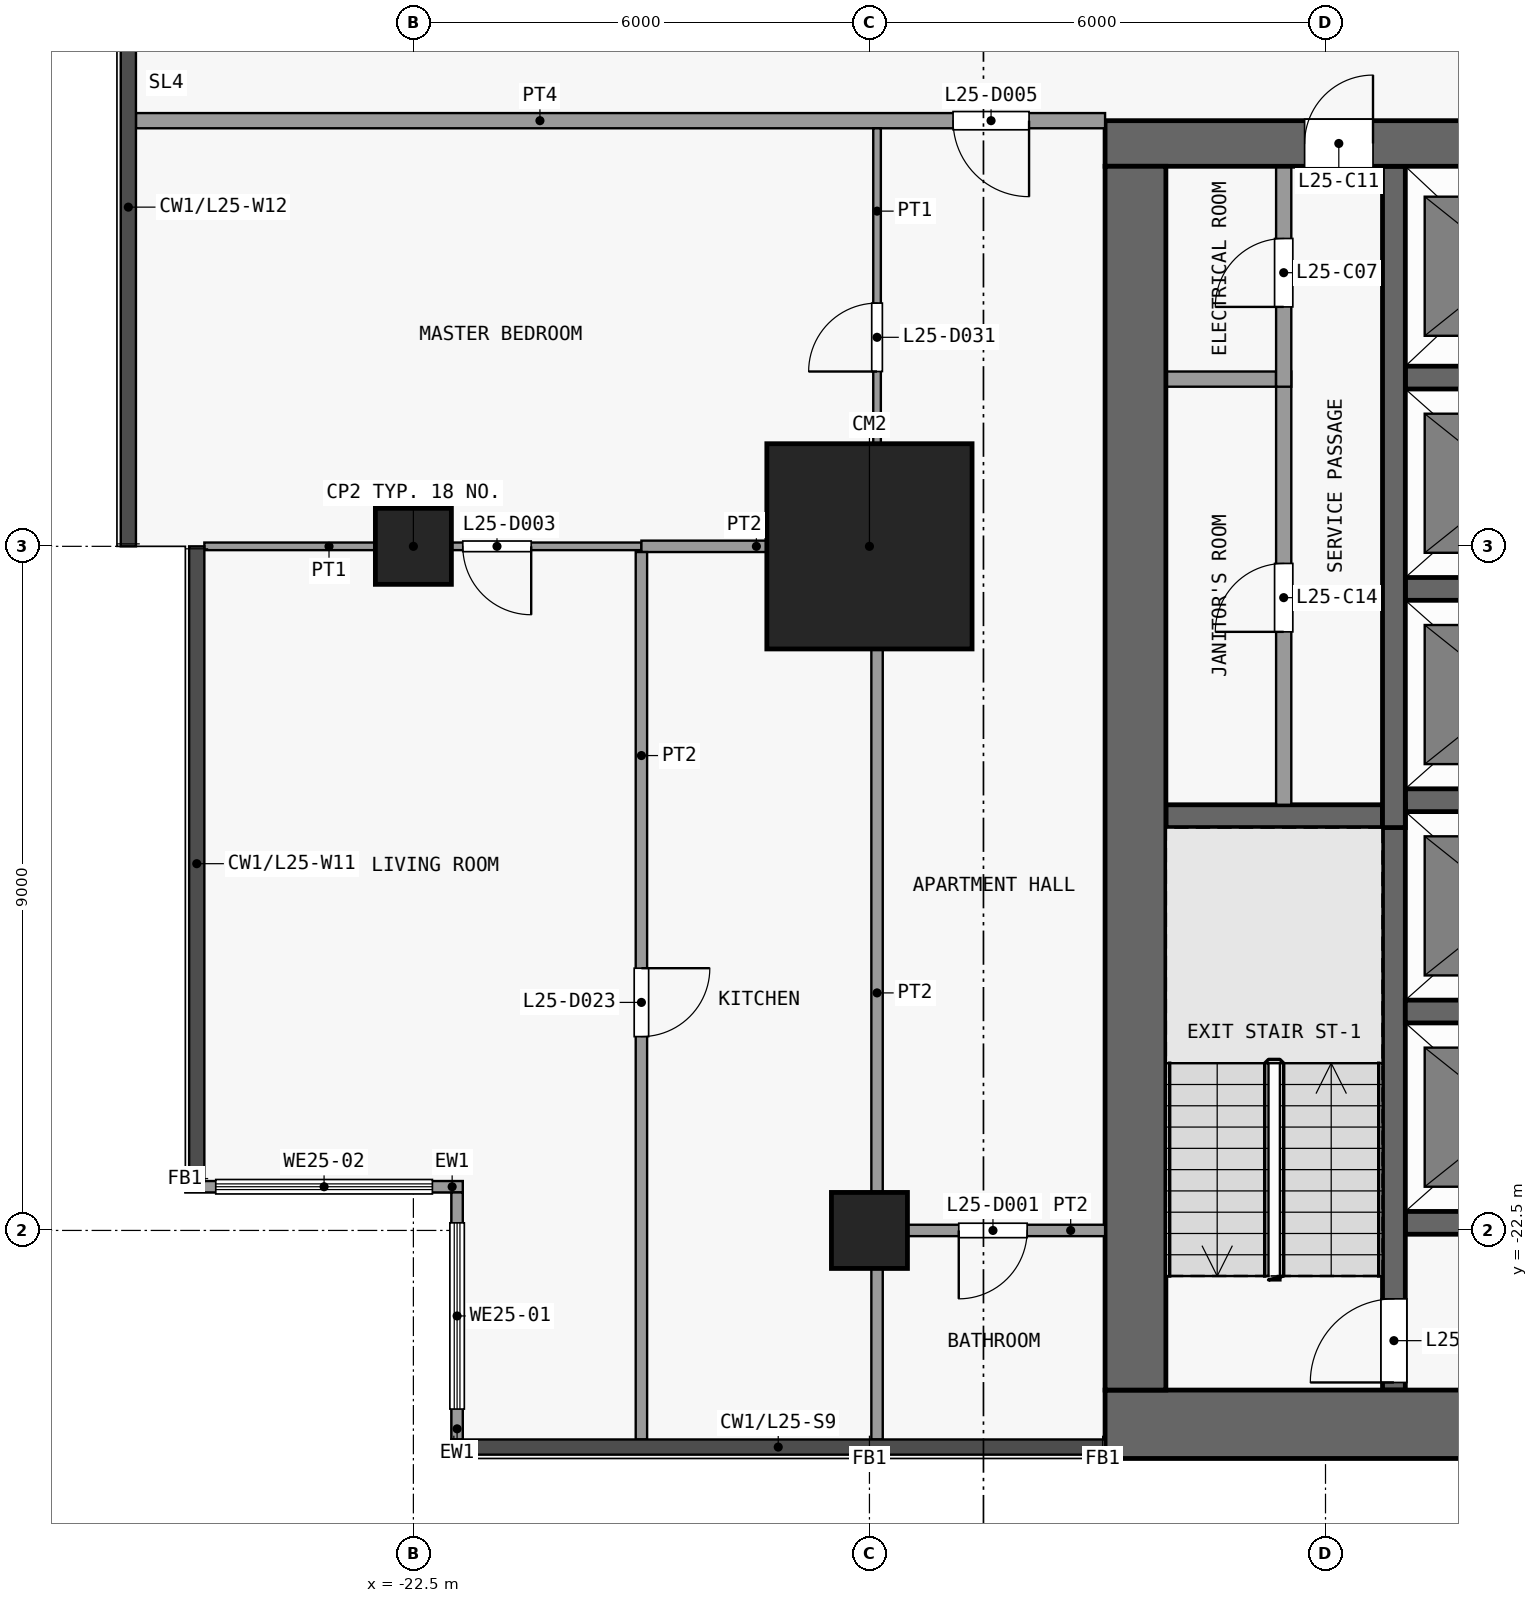
"""IFC4 building model, lengths in metres.
Left out: names, types, materials, properties, quantities, classifications, styles, units other than length and angle.
Written with IfcOpenShell. Run it as: python <this file> out.ifc"""

import sys

from ifc_helpers import new_model, si_unit, direction, frame, frame_2d, origin, origin_2d, place, context, subcontext, project, spatial, rectangle, extrude, element, fill, save


model = new_model("IFC4")
c1 = context("Model", 3, precision=1e-05, world=origin(), true_north=direction((0.0, 1.0)))
c2 = subcontext(c1, "Body", "Model", "MODEL_VIEW")
j1 = project(units=[si_unit("LENGTHUNIT", "METRE"), si_unit("PLANEANGLEUNIT", "RADIAN")], contexts=[c1])
p1 = place(None, origin())
s1 = spatial("IfcSite", under=j1, at=p1, CompositionType="ELEMENT")
p2 = place(p1, origin())
s2 = spatial("IfcBuilding", under=s1, at=p2, CompositionType="ELEMENT")
p3 = place(p2, frame((0.0, 0.0, 102.7)))
s3 = spatial("IfcBuildingStorey", under=s2, at=p3, CompositionType="ELEMENT", Elevation=102.7)
for number, where, z_axis, x_axis in (
    (1, (-22.5, -13.5, 0.0), (0.0, 0.0, 1.0), (1.0, 0.0, 0.0)),
    (2, (-16.5, -22.5, 0.0), (0.0, 0.0, 1.0), (1.0, 0.0, 0.0)),
):
    element("IfcColumn", number, at=place(p3, frame(where, z_axis=z_axis, x_axis=x_axis)), inside=s3, PredefinedType="COLUMN", context=c2, shape_type="SweptSolid", body=[
        extrude(rectangle(XDim=1.0, YDim=1.0, at=origin_2d()), origin(), (0.0, 0.0, 1.0), 3.6),
    ])
p4 = place(p3, frame((-16.5, -13.5, 0.0), z_axis=(0.0, 0.0, 1.0), x_axis=(1.0, 0.0, 0.0)))
e3 = element("IfcColumn", 3, at=p4, inside=s3, PredefinedType="COLUMN", context=c2, shape_type="SweptSolid", body=[
    extrude(rectangle(XDim=2.7, YDim=2.7, at=origin_2d()), origin(), (0.0, 0.0, 1.0), 3.6),
])
p5 = place(p3, frame((-13.4, -25.05, 0.0), z_axis=(0.0, 0.0, 1.0), x_axis=(1.0, 0.0, 0.0)))
e4 = element("IfcWall", 4, at=p5, inside=s3, PredefinedType="SHEAR", context=c2, shape_type="SweptSolid", body=[
    extrude(rectangle(XDim=26.8, YDim=0.9, at=frame_2d((13.4, 0.0))), origin(), (0.0, 0.0, 1.0), 3.3),
])
p6 = place(p3, frame((-13.4, -8.2, 0.0), z_axis=(0.0, 0.0, 1.0), x_axis=(1.0, 0.0, 0.0)))
e5 = element("IfcWall", 5, at=p6, inside=s3, PredefinedType="SHEAR", context=c2, shape_type="SweptSolid", body=[
    extrude(rectangle(XDim=26.8, YDim=0.6, at=frame_2d((13.4, 0.0))), origin(), (0.0, 0.0, 1.0), 3.3),
])
p7 = place(p6, frame((7.7, 0.0, 0.0)))
e6 = element("IfcOpeningElement", 6, at=p7, cuts=e5, PredefinedType="OPENING", context=c2, shape_type="SweptSolid", body=[
    extrude(rectangle(XDim=1.8, YDim=2.1, at=frame_2d((0.9, 1.05))), frame((0.0, 0.31, 0.0), z_axis=(0.0, -1.0, 0.0), x_axis=(1.0, 0.0, 0.0)), (0.0, 0.0, 1.0), 0.62),
])
p8 = place(p6, frame((17.3, 0.0, 0.0)))
e7 = element("IfcOpeningElement", 7, at=p8, cuts=e5, PredefinedType="OPENING", context=c2, shape_type="SweptSolid", body=[
    extrude(rectangle(XDim=1.8, YDim=2.1, at=frame_2d((0.9, 1.05))), frame((0.0, 0.31, 0.0), z_axis=(0.0, -1.0, 0.0), x_axis=(1.0, 0.0, 0.0)), (0.0, 0.0, 1.0), 0.62),
])
p9 = place(p6, frame((2.625, 0.0, 0.0)))
e8 = element("IfcOpeningElement", 8, at=p9, cuts=e5, PredefinedType="OPENING", context=c2, shape_type="SweptSolid", body=[
    extrude(rectangle(XDim=0.9, YDim=2.1, at=frame_2d((0.45, 1.05))), frame((0.0, 0.31, 0.0), z_axis=(0.0, -1.0, 0.0), x_axis=(1.0, 0.0, 0.0)), (0.0, 0.0, 1.0), 0.62),
])
p10 = place(p6, frame((23.275, 0.0, 0.0)))
e9 = element("IfcOpeningElement", 9, at=p10, cuts=e5, PredefinedType="OPENING", context=c2, shape_type="SweptSolid", body=[
    extrude(rectangle(XDim=0.9, YDim=2.1, at=frame_2d((0.45, 1.05))), frame((0.0, 0.31, 0.0), z_axis=(0.0, -1.0, 0.0), x_axis=(1.0, 0.0, 0.0)), (0.0, 0.0, 1.0), 0.62),
])
p11 = place(p3, frame((-13.0, -24.6, 0.0), z_axis=(0.0, 0.0, 1.0), x_axis=(0.0, 1.0, 0.0)))
e10 = element("IfcWall", 10, at=p11, inside=s3, PredefinedType="SHEAR", context=c2, shape_type="SweptSolid", body=[
    extrude(rectangle(XDim=16.1, YDim=0.8, at=frame_2d((8.05, 0.0))), origin(), (0.0, 0.0, 1.0), 3.3),
])
for number, where, z_axis, x_axis in (
    (11, (-9.45, -22.4, 0.0), (0.0, 0.0, 1.0), (1.0, 0.0, 0.0)),
    (12, (-9.45, -19.62, 0.0), (0.0, 0.0, 1.0), (1.0, 0.0, 0.0)),
):
    element("IfcWall", number, at=place(p3, frame(where, z_axis=z_axis, x_axis=x_axis)), inside=s3, PredefinedType="SHEAR", context=c2, shape_type="SweptSolid", body=[
        extrude(rectangle(XDim=2.8, YDim=0.3, at=frame_2d((1.4, 0.0))), origin(), (0.0, 0.0, 1.0), 3.3),
    ])
p12 = place(p3, frame((-12.6, -17.05, 0.0), z_axis=(0.0, 0.0, 1.0), x_axis=(1.0, 0.0, 0.0)))
e13 = element("IfcWall", 13, at=p12, inside=s3, PredefinedType="SHEAR", context=c2, shape_type="SweptSolid", body=[
    extrude(rectangle(XDim=2.85, YDim=0.3, at=frame_2d((1.425, 0.0))), origin(), (0.0, 0.0, 1.0), 3.3),
])
for number, where, z_axis, x_axis in (
    (14, (-9.45, -16.84, 0.0), (0.0, 0.0, 1.0), (1.0, 0.0, 0.0)),
    (15, (-9.45, -14.06, 0.0), (0.0, 0.0, 1.0), (1.0, 0.0, 0.0)),
):
    element("IfcWall", number, at=place(p3, frame(where, z_axis=z_axis, x_axis=x_axis)), inside=s3, PredefinedType="SHEAR", context=c2, shape_type="SweptSolid", body=[
        extrude(rectangle(XDim=2.8, YDim=0.3, at=frame_2d((1.4, 0.0))), origin(), (0.0, 0.0, 1.0), 3.3),
    ])
p13 = place(p3, frame((-12.6, -11.3, 0.0), z_axis=(0.0, 0.0, 1.0), x_axis=(1.0, 0.0, 0.0)))
e16 = element("IfcWall", 16, at=p13, inside=s3, PredefinedType="PARTITIONING", context=c2, shape_type="SweptSolid", body=[
    extrude(rectangle(XDim=1.45, YDim=0.2, at=frame_2d((0.725, 0.0))), origin(), (0.0, 0.0, 1.0), 3.3),
])
p14 = place(p3, frame((-9.45, -11.28, 0.0), z_axis=(0.0, 0.0, 1.0), x_axis=(1.0, 0.0, 0.0)))
e17 = element("IfcWall", 17, at=p14, inside=s3, PredefinedType="SHEAR", context=c2, shape_type="SweptSolid", body=[
    extrude(rectangle(XDim=2.8, YDim=0.3, at=frame_2d((1.4, 0.0))), origin(), (0.0, 0.0, 1.0), 3.3),
])
p15 = place(p3, frame((-11.05, -16.9, 0.0), z_axis=(0.0, 0.0, 1.0), x_axis=(0.0, 1.0, 0.0)))
e18 = element("IfcWall", 18, at=p15, inside=s3, PredefinedType="PARTITIONING", context=c2, shape_type="SweptSolid", body=[
    extrude(rectangle(XDim=5.7, YDim=0.2, at=frame_2d((2.85, 0.0))), origin(), (0.0, 0.0, 1.0), 3.3),
])
p16 = place(p15, frame((2.275, 0.0, 0.0)))
e19 = element("IfcOpeningElement", 19, at=p16, cuts=e18, PredefinedType="OPENING", context=c2, shape_type="SweptSolid", body=[
    extrude(rectangle(XDim=0.9, YDim=2.1, at=frame_2d((0.45, 1.05))), frame((0.0, 0.11, 0.0), z_axis=(0.0, -1.0, 0.0), x_axis=(1.0, 0.0, 0.0)), (0.0, 0.0, 1.0), 0.22),
])
p17 = place(p3, frame((-11.05, -11.4, 0.0), z_axis=(0.0, 0.0, 1.0), x_axis=(0.0, 1.0, 0.0)))
e20 = element("IfcWall", 20, at=p17, inside=s3, PredefinedType="PARTITIONING", context=c2, shape_type="SweptSolid", body=[
    extrude(rectangle(XDim=2.9, YDim=0.2, at=frame_2d((1.45, 0.0))), origin(), (0.0, 0.0, 1.0), 3.3),
])
p18 = place(p17, frame((1.05, 0.0, 0.0)))
e21 = element("IfcOpeningElement", 21, at=p18, cuts=e20, PredefinedType="OPENING", context=c2, shape_type="SweptSolid", body=[
    extrude(rectangle(XDim=0.9, YDim=2.1, at=frame_2d((0.45, 1.05))), frame((0.0, 0.11, 0.0), z_axis=(0.0, -1.0, 0.0), x_axis=(1.0, 0.0, 0.0)), (0.0, 0.0, 1.0), 0.22),
])
p19 = place(p3, frame((-9.6, -24.6, 0.0), z_axis=(0.0, 0.0, 1.0), x_axis=(0.0, 1.0, 0.0)))
e22 = element("IfcWall", 22, at=p19, inside=s3, PredefinedType="SHEAR", context=c2, shape_type="SweptSolid", body=[
    extrude(rectangle(XDim=7.7, YDim=0.3, at=frame_2d((3.85, 0.0))), origin(), (0.0, 0.0, 1.0), 3.3),
])
p20 = place(p19, frame((0.1, 0.0, 0.0)))
e23 = element("IfcOpeningElement", 23, at=p20, cuts=e22, PredefinedType="OPENING", context=c2, shape_type="SweptSolid", body=[
    extrude(rectangle(XDim=1.1, YDim=2.1, at=frame_2d((0.55, 1.05))), frame((0.0, 0.16, 0.0), z_axis=(0.0, -1.0, 0.0), x_axis=(1.0, 0.0, 0.0)), (0.0, 0.0, 1.0), 0.32),
])
p21 = place(p3, frame((-9.6, -17.2, 0.0), z_axis=(0.0, 0.0, 1.0), x_axis=(0.0, 1.0, 0.0)))
e24 = element("IfcWall", 24, at=p21, inside=s3, PredefinedType="SHEAR", context=c2, shape_type="SweptSolid", body=[
    extrude(rectangle(XDim=8.7, YDim=0.3, at=frame_2d((4.35, 0.0))), origin(), (0.0, 0.0, 1.0), 3.3),
])
p22 = place(p3, frame((-21.925, -25.25, 0.0), z_axis=(0.0, 0.0, 1.0), x_axis=(0.0, 1.0, 0.0)))
e25 = element("IfcWall", 25, at=p22, inside=s3, PredefinedType="SOLIDWALL", context=c2, shape_type="SweptSolid", body=[
    extrude(rectangle(XDim=3.25, YDim=0.15, at=frame_2d((1.625, 0.0))), origin(), (0.0, 0.0, 1.0), 3.3),
])
p23 = place(p22, frame((0.4, 0.0, 0.9)))
e26 = element("IfcOpeningElement", 26, at=p23, cuts=e25, PredefinedType="OPENING", context=c2, shape_type="SweptSolid", body=[
    extrude(rectangle(XDim=2.45, YDim=2.4, at=frame_2d((1.225, 1.2))), frame((0.0, 0.085, 0.0), z_axis=(0.0, -1.0, 0.0), x_axis=(1.0, 0.0, 0.0)), (0.0, 0.0, 1.0), 0.17),
])
p24 = place(p3, frame((-21.85, -21.925, 0.0), z_axis=(0.0, 0.0, 1.0), x_axis=(-1.0, 0.0, 0.0)))
e27 = element("IfcWall", 27, at=p24, inside=s3, PredefinedType="SOLIDWALL", context=c2, shape_type="SweptSolid", body=[
    extrude(rectangle(XDim=3.65, YDim=0.15, at=frame_2d((1.825, 0.0))), origin(), (0.0, 0.0, 1.0), 3.3),
])
p25 = place(p24, frame((0.4, 0.0, 0.9)))
e28 = element("IfcOpeningElement", 28, at=p25, cuts=e27, PredefinedType="OPENING", context=c2, shape_type="SweptSolid", body=[
    extrude(rectangle(XDim=2.85, YDim=2.4, at=frame_2d((1.425, 1.2))), frame((0.0, 0.085, 0.0), z_axis=(0.0, -1.0, 0.0), x_axis=(1.0, 0.0, 0.0)), (0.0, 0.0, 1.0), 0.17),
])
p26 = place(p3, frame((-16.325, -22.5, 0.0), z_axis=(0.0, 0.0, 1.0), x_axis=(1.0, 0.0, 0.0)))
e29 = element("IfcWall", 29, at=p26, inside=s3, PredefinedType="PARTITIONING", context=c2, shape_type="SweptSolid", body=[
    extrude(rectangle(XDim=2.925, YDim=0.15, at=frame_2d((1.462, 0.0))), origin(), (0.0, 0.0, 1.0), 3.3),
])
p27 = place(p26, frame((1.0, 0.0, 0.0)))
e30 = element("IfcOpeningElement", 30, at=p27, cuts=e29, PredefinedType="OPENING", context=c2, shape_type="SweptSolid", body=[
    extrude(rectangle(XDim=0.9, YDim=2.1, at=frame_2d((0.45, 1.05))), frame((0.0, 0.085, 0.0), z_axis=(0.0, -1.0, 0.0), x_axis=(1.0, 0.0, 0.0)), (0.0, 0.0, 1.0), 0.17),
])
p28 = place(p3, frame((-25.25, -13.5, 0.0), z_axis=(0.0, 0.0, 1.0), x_axis=(1.0, 0.0, 0.0)))
e31 = element("IfcWall", 31, at=p28, inside=s3, PredefinedType="PARTITIONING", context=c2, shape_type="SweptSolid", body=[
    extrude(rectangle(XDim=5.75, YDim=0.1, at=frame_2d((2.875, 0.0))), origin(), (0.0, 0.0, 1.0), 3.3),
])
p29 = place(p28, frame((3.4, 0.0, 0.0)))
e32 = element("IfcOpeningElement", 32, at=p29, cuts=e31, PredefinedType="OPENING", context=c2, shape_type="SweptSolid", body=[
    extrude(rectangle(XDim=0.9, YDim=2.1, at=frame_2d((0.45, 1.05))), frame((0.0, 0.06, 0.0), z_axis=(0.0, -1.0, 0.0), x_axis=(1.0, 0.0, 0.0)), (0.0, 0.0, 1.0), 0.12),
])
p30 = place(p3, frame((-19.5, -13.5, 0.0), z_axis=(0.0, 0.0, 1.0), x_axis=(1.0, 0.0, 0.0)))
e33 = element("IfcWall", 33, at=p30, inside=s3, PredefinedType="PARTITIONING", context=c2, shape_type="SweptSolid", body=[
    extrude(rectangle(XDim=3.025, YDim=0.15, at=frame_2d((1.512, 0.0))), origin(), (0.0, 0.0, 1.0), 3.3),
])
p31 = place(p3, frame((-26.15, -7.9, 0.0), z_axis=(0.0, 0.0, 1.0), x_axis=(1.0, 0.0, 0.0)))
e34 = element("IfcWall", 34, at=p31, inside=s3, PredefinedType="PARTITIONING", context=c2, shape_type="SweptSolid", body=[
    extrude(rectangle(XDim=12.75, YDim=0.2, at=frame_2d((6.375, 0.0))), origin(), (0.0, 0.0, 1.0), 3.3),
])
p32 = place(p31, frame((10.75, 0.0, 0.0)))
e35 = element("IfcOpeningElement", 35, at=p32, cuts=e34, PredefinedType="OPENING", context=c2, shape_type="SweptSolid", body=[
    extrude(rectangle(XDim=1.0, YDim=2.1, at=frame_2d((0.5, 1.05))), frame((0.0, 0.11, 0.0), z_axis=(0.0, -1.0, 0.0), x_axis=(1.0, 0.0, 0.0)), (0.0, 0.0, 1.0), 0.22),
])
p33 = place(p3, frame((-19.5, -25.25, 0.0), z_axis=(0.0, 0.0, 1.0), x_axis=(0.0, 1.0, 0.0)))
e36 = element("IfcWall", 36, at=p33, inside=s3, PredefinedType="PARTITIONING", context=c2, shape_type="SweptSolid", body=[
    extrude(rectangle(XDim=11.675, YDim=0.15, at=frame_2d((5.837, 0.0))), origin(), (0.0, 0.0, 1.0), 3.3),
])
p34 = place(p33, frame((5.3, 0.0, 0.0)))
e37 = element("IfcOpeningElement", 37, at=p34, cuts=e36, PredefinedType="OPENING", context=c2, shape_type="SweptSolid", body=[
    extrude(rectangle(XDim=0.9, YDim=2.1, at=frame_2d((0.45, 1.05))), frame((0.0, 0.085, 0.0), z_axis=(0.0, -1.0, 0.0), x_axis=(1.0, 0.0, 0.0)), (0.0, 0.0, 1.0), 0.17),
])
p35 = place(p3, frame((-16.4, -13.5, 0.0), z_axis=(0.0, 0.0, 1.0), x_axis=(0.0, 1.0, 0.0)))
e38 = element("IfcWall", 38, at=p35, inside=s3, PredefinedType="PARTITIONING", context=c2, shape_type="SweptSolid", body=[
    extrude(rectangle(XDim=5.5, YDim=0.1, at=frame_2d((2.75, 0.0))), origin(), (0.0, 0.0, 1.0), 3.3),
])
p36 = place(p35, frame((2.3, 0.0, 0.0)))
e39 = element("IfcOpeningElement", 39, at=p36, cuts=e38, PredefinedType="OPENING", context=c2, shape_type="SweptSolid", body=[
    extrude(rectangle(XDim=0.9, YDim=2.1, at=frame_2d((0.45, 1.05))), frame((0.0, 0.06, 0.0), z_axis=(0.0, -1.0, 0.0), x_axis=(1.0, 0.0, 0.0)), (0.0, 0.0, 1.0), 0.12),
])
p37 = place(p3, frame((-16.4, -25.25, 0.0), z_axis=(0.0, 0.0, 1.0), x_axis=(0.0, 1.0, 0.0)))
e40 = element("IfcWall", 40, at=p37, inside=s3, PredefinedType="PARTITIONING", context=c2, shape_type="SweptSolid", body=[
    extrude(rectangle(XDim=11.75, YDim=0.15, at=frame_2d((5.875, 0.0))), origin(), (0.0, 0.0, 1.0), 3.3),
])
p38 = place(p18, origin())
e41 = element("IfcDoor", 41, at=p38, inside=s3, OperationType="SINGLE_SWING_LEFT", PredefinedType="DOOR", context=c2, shape_type="SweptSolid", body=[
    extrude(rectangle(XDim=0.9, YDim=2.1, at=frame_2d((0.45, 1.05))), frame((0.0, 0.025, 0.0), z_axis=(0.0, -1.0, 0.0), x_axis=(1.0, 0.0, 0.0)), (0.0, 0.0, 1.0), 0.05),
])
fill(e21, e41)
p39 = place(p9, origin())
e42 = element("IfcDoor", 42, at=p39, inside=s3, OperationType="SINGLE_SWING_RIGHT", PredefinedType="DOOR", context=c2, shape_type="SweptSolid", body=[
    extrude(rectangle(XDim=0.9, YDim=2.1, at=frame_2d((0.45, 1.05))), frame((0.0, 0.025, 0.0), z_axis=(0.0, -1.0, 0.0), x_axis=(1.0, 0.0, 0.0)), (0.0, 0.0, 1.0), 0.05),
])
fill(e8, e42)
p40 = place(p16, origin())
e43 = element("IfcDoor", 43, at=p40, inside=s3, OperationType="SINGLE_SWING_LEFT", PredefinedType="DOOR", context=c2, shape_type="SweptSolid", body=[
    extrude(rectangle(XDim=0.9, YDim=2.1, at=frame_2d((0.45, 1.05))), frame((0.0, 0.025, 0.0), z_axis=(0.0, -1.0, 0.0), x_axis=(1.0, 0.0, 0.0)), (0.0, 0.0, 1.0), 0.05),
])
fill(e19, e43)
p41 = place(p20, origin())
e44 = element("IfcDoor", 44, at=p41, inside=s3, OperationType="SINGLE_SWING_LEFT", PredefinedType="DOOR", context=c2, shape_type="SweptSolid", body=[
    extrude(rectangle(XDim=1.1, YDim=2.1, at=frame_2d((0.55, 1.05))), frame((0.0, 0.025, 0.0), z_axis=(0.0, -1.0, 0.0), x_axis=(1.0, 0.0, 0.0)), (0.0, 0.0, 1.0), 0.05),
])
fill(e23, e44)
p42 = place(p23, origin())
e45 = element("IfcWindow", 45, at=p42, inside=s3, PartitioningType="SINGLE_PANEL", PredefinedType="WINDOW", context=c2, shape_type="SweptSolid", body=[
    extrude(rectangle(XDim=2.45, YDim=2.4, at=frame_2d((1.225, 1.2))), frame((0.0, 0.03, 0.0), z_axis=(0.0, -1.0, 0.0), x_axis=(1.0, 0.0, 0.0)), (0.0, 0.0, 1.0), 0.06),
])
fill(e26, e45)
p43 = place(p25, origin())
e46 = element("IfcWindow", 46, at=p43, inside=s3, PartitioningType="SINGLE_PANEL", PredefinedType="WINDOW", context=c2, shape_type="SweptSolid", body=[
    extrude(rectangle(XDim=2.85, YDim=2.4, at=frame_2d((1.425, 1.2))), frame((0.0, 0.03, 0.0), z_axis=(0.0, -1.0, 0.0), x_axis=(1.0, 0.0, 0.0)), (0.0, 0.0, 1.0), 0.06),
])
fill(e28, e46)
p44 = place(p27, origin())
e47 = element("IfcDoor", 47, at=p44, inside=s3, OperationType="SINGLE_SWING_LEFT", PredefinedType="DOOR", context=c2, shape_type="SweptSolid", body=[
    extrude(rectangle(XDim=0.9, YDim=2.1, at=frame_2d((0.45, 1.05))), frame((0.0, 0.025, 0.0), z_axis=(0.0, -1.0, 0.0), x_axis=(1.0, 0.0, 0.0)), (0.0, 0.0, 1.0), 0.05),
])
fill(e30, e47)
p45 = place(p29, origin())
e48 = element("IfcDoor", 48, at=p45, inside=s3, OperationType="SINGLE_SWING_RIGHT", PredefinedType="DOOR", context=c2, shape_type="SweptSolid", body=[
    extrude(rectangle(XDim=0.9, YDim=2.1, at=frame_2d((0.45, 1.05))), frame((0.0, 0.025, 0.0), z_axis=(0.0, -1.0, 0.0), x_axis=(1.0, 0.0, 0.0)), (0.0, 0.0, 1.0), 0.05),
])
fill(e32, e48)
p46 = place(p32, origin())
e49 = element("IfcDoor", 49, at=p46, inside=s3, OperationType="SINGLE_SWING_RIGHT", PredefinedType="DOOR", context=c2, shape_type="SweptSolid", body=[
    extrude(rectangle(XDim=1.0, YDim=2.1, at=frame_2d((0.5, 1.05))), frame((0.0, 0.025, 0.0), z_axis=(0.0, -1.0, 0.0), x_axis=(1.0, 0.0, 0.0)), (0.0, 0.0, 1.0), 0.05),
])
fill(e35, e49)
p47 = place(p34, origin())
e50 = element("IfcDoor", 50, at=p47, inside=s3, OperationType="SINGLE_SWING_RIGHT", PredefinedType="DOOR", context=c2, shape_type="SweptSolid", body=[
    extrude(rectangle(XDim=0.9, YDim=2.1, at=frame_2d((0.45, 1.05))), frame((0.0, 0.025, 0.0), z_axis=(0.0, -1.0, 0.0), x_axis=(1.0, 0.0, 0.0)), (0.0, 0.0, 1.0), 0.05),
])
fill(e37, e50)
p48 = place(p36, origin())
e51 = element("IfcDoor", 51, at=p48, inside=s3, OperationType="SINGLE_SWING_RIGHT", PredefinedType="DOOR", context=c2, shape_type="SweptSolid", body=[
    extrude(rectangle(XDim=0.9, YDim=2.1, at=frame_2d((0.45, 1.05))), frame((0.0, 0.025, 0.0), z_axis=(0.0, -1.0, 0.0), x_axis=(1.0, 0.0, 0.0)), (0.0, 0.0, 1.0), 0.05),
])
fill(e39, e51)
save(model, sys.argv[1])
